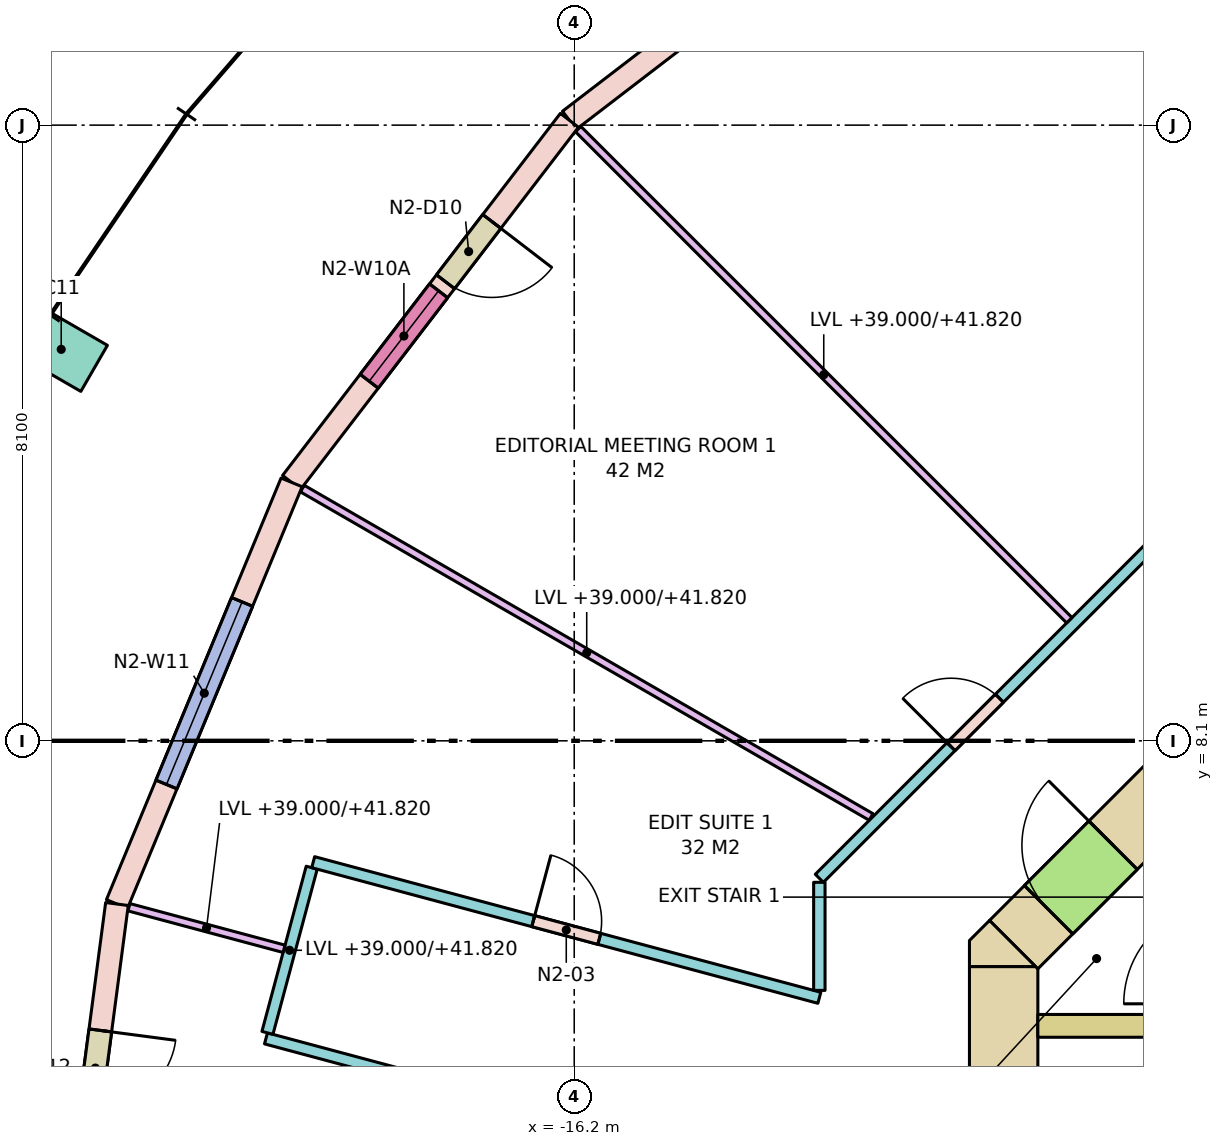
"""IFC4 building model, lengths in metres.
Left out: names, types, materials, properties, quantities, classifications, styles, units other than length and angle.
Written with IfcOpenShell. Run it as: python <this file> out.ifc"""

import sys

from ifc_helpers import new_model, si_unit, direction, frame, frame_2d, origin, origin_2d, place, context, subcontext, project, spatial, polyline, rectangle, outline, extrude, element, fill, save


model = new_model("IFC4")
c1 = context("Model", 3, precision=1e-05, world=origin(), true_north=direction((0.0, 1.0)))
c2 = subcontext(c1, "Body", "Model", "MODEL_VIEW")
j1 = project(units=[si_unit("LENGTHUNIT", "METRE"), si_unit("PLANEANGLEUNIT", "RADIAN")], contexts=[c1])
p1 = place(None, origin())
s1 = spatial("IfcSite", under=j1, at=p1, CompositionType="ELEMENT")
p2 = place(p1, origin())
s2 = spatial("IfcBuilding", under=s1, at=p2, CompositionType="ELEMENT")
p3 = place(p2, frame((0.0, 0.0, 39.0)))
s3 = spatial("IfcBuildingStorey", under=s2, at=p3, CompositionType="ELEMENT", Elevation=39.0)
p4 = place(p3, frame((-22.95, 13.25, 0.0), z_axis=(0.0, 0.0, 1.0), x_axis=(-0.5, -0.866025403784, 0.0)))
e1 = element("IfcColumn", 1, at=p4, inside=s3, PredefinedType="COLUMN", context=c2, shape_type="SweptSolid", body=[
    extrude(rectangle(XDim=0.7, YDim=1.0, at=origin_2d()), origin(), (0.0, 0.0, 1.0), 4.0),
])
p5 = place(p3, frame((-10.55, -5.13, -0.28), z_axis=(0.0, 0.0, 1.0), x_axis=(0.0, 1.0, 0.0)))
e2 = element("IfcWall", 2, at=p5, inside=s3, PredefinedType="SHEAR", context=c2, shape_type="SweptSolid", body=[
    extrude(rectangle(XDim=10.26, YDim=0.9, at=frame_2d((5.13, 0.0))), origin(), (0.0, 0.0, 1.0), 4.0),
])
p6 = place(p5, frame((4.13, 0.0, 0.28)))
e3 = element("IfcOpeningElement", 3, at=p6, cuts=e2, PredefinedType="OPENING", context=c2, shape_type="SweptSolid", body=[
    extrude(rectangle(XDim=2.0, YDim=2.1, at=frame_2d((1.0, 1.05))), frame((0.0, 0.46, 0.0), z_axis=(0.0, -1.0, 0.0), x_axis=(1.0, 0.0, 0.0)), (0.0, 0.0, 1.0), 0.92),
])
p7 = place(p3, frame((-10.418, 5.418, -0.28), z_axis=(0.0, 0.0, 1.0), x_axis=(0.707106781187, 0.707106781187, 0.0)))
e4 = element("IfcWall", 4, at=p7, inside=s3, PredefinedType="SHEAR", context=c2, shape_type="SweptSolid", body=[
    extrude(rectangle(XDim=4.243, YDim=0.9, at=frame_2d((2.121, 0.0))), origin(), (0.0, 0.0, 1.0), 4.0),
])
p8 = place(p7, frame((0.65, 0.0, 0.28)))
e5 = element("IfcOpeningElement", 5, at=p8, cuts=e4, PredefinedType="OPENING", context=c2, shape_type="SweptSolid", body=[
    extrude(rectangle(XDim=1.2, YDim=2.1, at=frame_2d((0.6, 1.05))), frame((0.0, 0.46, 0.0), z_axis=(0.0, -1.0, 0.0), x_axis=(1.0, 0.0, 0.0)), (0.0, 0.0, 1.0), 0.92),
])
p9 = place(p3, frame((0.0, 0.0, -0.28)))
e6 = element("IfcWall", 6, at=p9, inside=s3, PredefinedType="SHEAR", context=c2, shape_type="SweptSolid", body=[
    extrude(outline(polyline([(-10.736, 5.736), (-10.13, 5.13), (-11.0, 5.13), (-11.0, 5.473), (-10.736, 5.736)])), origin(), (0.0, 0.0, 1.0), 4.0),
])
p10 = place(p3, frame((-10.1, 4.35, 0.0), z_axis=(0.0, 0.0, 1.0), x_axis=(1.0, 0.0, 0.0)))
e7 = element("IfcWall", 7, at=p10, inside=s3, PredefinedType="SOLIDWALL", context=c2, shape_type="SweptSolid", body=[
    extrude(rectangle(XDim=8.1, YDim=0.3, at=frame_2d((4.05, 0.0))), origin(), (0.0, 0.0, 1.0), 3.72),
])
p11 = place(p3, frame((-11.5, 19.919, 0.0), z_axis=(0.0, 0.0, 1.0), x_axis=(-0.793339924758, -0.608778912074, 0.0)))
e8 = element("IfcWall", 8, at=p11, inside=s3, PredefinedType="STANDARD", context=c2, shape_type="SweptSolid", body=[
    extrude(rectangle(XDim=6.004, YDim=0.3, at=frame_2d((3.002, 0.0))), origin(), (0.0, 0.0, 1.0), 3.72),
])
p12 = place(p11, frame((1.702, 0.0, 0.8)))
e9 = element("IfcOpeningElement", 9, at=p12, cuts=e8, PredefinedType="OPENING", context=c2, shape_type="SweptSolid", body=[
    extrude(rectangle(XDim=2.6, YDim=2.7, at=frame_2d((1.3, 1.35))), frame((0.0, 0.16, 0.0), z_axis=(0.0, -1.0, 0.0), x_axis=(1.0, 0.0, 0.0)), (0.0, 0.0, 1.0), 0.32),
])
p13 = place(p3, frame((-16.263, 16.263, 0.0), z_axis=(0.0, 0.0, 1.0), x_axis=(-0.608778912074, -0.793339924758, 0.0)))
e10 = element("IfcWall", 10, at=p13, inside=s3, PredefinedType="STANDARD", context=c2, shape_type="SweptSolid", body=[
    extrude(rectangle(XDim=6.004, YDim=0.3, at=frame_2d((3.002, 0.0))), origin(), (0.0, 0.0, 1.0), 3.72),
])
p14 = place(p13, frame((1.677, 0.0, 0.0)))
e11 = element("IfcOpeningElement", 11, at=p14, cuts=e10, PredefinedType="OPENING", context=c2, shape_type="SweptSolid", body=[
    extrude(rectangle(XDim=1.0, YDim=2.4, at=frame_2d((0.5, 1.2))), frame((0.0, 0.16, 0.0), z_axis=(0.0, -1.0, 0.0), x_axis=(1.0, 0.0, 0.0)), (0.0, 0.0, 1.0), 0.32),
])
p15 = place(p13, frame((2.827, 0.0, 0.8)))
e12 = element("IfcOpeningElement", 12, at=p15, cuts=e10, PredefinedType="OPENING", context=c2, shape_type="SweptSolid", body=[
    extrude(rectangle(XDim=1.5, YDim=2.7, at=frame_2d((0.75, 1.35))), frame((0.0, 0.16, 0.0), z_axis=(0.0, -1.0, 0.0), x_axis=(1.0, 0.0, 0.0)), (0.0, 0.0, 1.0), 0.32),
])
p16 = place(p3, frame((-19.919, 11.5, 0.0), z_axis=(0.0, 0.0, 1.0), x_axis=(-0.382671411433, -0.923884511653, 0.0)))
e13 = element("IfcWall", 13, at=p16, inside=s3, PredefinedType="STANDARD", context=c2, shape_type="SweptSolid", body=[
    extrude(rectangle(XDim=6.004, YDim=0.3, at=frame_2d((3.002, 0.0))), origin(), (0.0, 0.0, 1.0), 3.72),
])
p17 = place(p16, frame((1.702, 0.0, 0.8)))
e14 = element("IfcOpeningElement", 14, at=p17, cuts=e13, PredefinedType="OPENING", context=c2, shape_type="SweptSolid", body=[
    extrude(rectangle(XDim=2.6, YDim=2.7, at=frame_2d((1.3, 1.35))), frame((0.0, 0.16, 0.0), z_axis=(0.0, -1.0, 0.0), x_axis=(1.0, 0.0, 0.0)), (0.0, 0.0, 1.0), 0.32),
])
p18 = place(p3, frame((-22.216, 5.953, 0.0), z_axis=(0.0, 0.0, 1.0), x_axis=(-0.130522880875, -0.991445297315, 0.0)))
e15 = element("IfcWall", 15, at=p18, inside=s3, PredefinedType="STANDARD", context=c2, shape_type="SweptSolid", body=[
    extrude(rectangle(XDim=6.004, YDim=0.3, at=frame_2d((3.002, 0.0))), origin(), (0.0, 0.0, 1.0), 3.72),
])
p19 = place(p18, frame((1.677, 0.0, 0.0)))
e16 = element("IfcOpeningElement", 16, at=p19, cuts=e15, PredefinedType="OPENING", context=c2, shape_type="SweptSolid", body=[
    extrude(rectangle(XDim=1.0, YDim=2.4, at=frame_2d((0.5, 1.2))), frame((0.0, 0.16, 0.0), z_axis=(0.0, -1.0, 0.0), x_axis=(1.0, 0.0, 0.0)), (0.0, 0.0, 1.0), 0.32),
])
p20 = place(p18, frame((2.827, 0.0, 0.8)))
e17 = element("IfcOpeningElement", 17, at=p20, cuts=e15, PredefinedType="OPENING", context=c2, shape_type="SweptSolid", body=[
    extrude(rectangle(XDim=1.5, YDim=2.7, at=frame_2d((0.75, 1.35))), frame((0.0, 0.16, 0.0), z_axis=(0.0, -1.0, 0.0), x_axis=(1.0, 0.0, 0.0)), (0.0, 0.0, 1.0), 0.32),
])
p21 = place(p3, frame((-13.045, 2.253, 0.0), z_axis=(0.0, 0.0, 1.0), x_axis=(-0.965924840231, 0.258822725092, 0.0)))
e18 = element("IfcWall", 18, at=p21, inside=s3, PredefinedType="PARTITIONING", context=c2, shape_type="SweptSolid", body=[
    extrude(rectangle(XDim=7.465, YDim=0.15, at=frame_2d((3.732, 0.0))), origin(), (0.0, 0.0, 1.0), 3.72),
])
p22 = place(p3, frame((-20.236, 4.258, 0.0), z_axis=(0.0, 0.0, 1.0), x_axis=(0.258891558609, 0.965906393436, 0.0)))
e19 = element("IfcWall", 19, at=p22, inside=s3, PredefinedType="PARTITIONING", context=c2, shape_type="SweptSolid", body=[
    extrude(rectangle(XDim=2.25, YDim=0.15, at=frame_2d((1.125, 0.0))), origin(), (0.0, 0.0, 1.0), 2.82),
])
p23 = place(p3, frame((-19.635, 6.503, 0.0), z_axis=(0.0, 0.0, 1.0), x_axis=(0.965924499418, -0.258823997003, 0.0)))
e20 = element("IfcWall", 20, at=p23, inside=s3, PredefinedType="PARTITIONING", context=c2, shape_type="SweptSolid", body=[
    extrude(rectangle(XDim=6.894, YDim=0.15, at=frame_2d((3.447, 0.0))), origin(), (0.0, 0.0, 1.0), 3.72),
])
p24 = place(p23, frame((2.997, 0.0, 0.0)))
e21 = element("IfcOpeningElement", 21, at=p24, cuts=e20, PredefinedType="OPENING", context=c2, shape_type="SweptSolid", body=[
    extrude(rectangle(XDim=0.9, YDim=2.1, at=frame_2d((0.45, 1.05))), frame((0.0, 0.085, 0.0), z_axis=(0.0, -1.0, 0.0), x_axis=(1.0, 0.0, 0.0)), (0.0, 0.0, 1.0), 0.17),
])
p25 = place(p3, frame((-12.975, 4.816, 0.0), z_axis=(0.0, 0.0, 1.0), x_axis=(0.0, 1.0, 0.0)))
e22 = element("IfcWall", 22, at=p25, inside=s3, PredefinedType="PARTITIONING", context=c2, shape_type="SweptSolid", body=[
    extrude(rectangle(XDim=1.422, YDim=0.15, at=frame_2d((0.711, 0.0))), origin(), (0.0, 0.0, 1.0), 3.72),
])
p26 = place(p3, frame((-12.975, 6.291, 0.0), z_axis=(0.0, 0.0, 1.0), x_axis=(0.707125355289, 0.707088206597, 0.0)))
e23 = element("IfcWall", 23, at=p26, inside=s3, PredefinedType="PARTITIONING", context=c2, shape_type="SweptSolid", body=[
    extrude(rectangle(XDim=6.572, YDim=0.15, at=frame_2d((3.286, 0.0))), origin(), (0.0, 0.0, 1.0), 2.82),
])
p27 = place(p26, frame((2.45, 0.0, 0.0)))
e24 = element("IfcOpeningElement", 24, at=p27, cuts=e23, PredefinedType="OPENING", context=c2, shape_type="SweptSolid", body=[
    extrude(rectangle(XDim=0.9, YDim=2.1, at=frame_2d((0.45, 1.05))), frame((0.0, 0.085, 0.0), z_axis=(0.0, -1.0, 0.0), x_axis=(1.0, 0.0, 0.0)), (0.0, 0.0, 1.0), 0.17),
])
p28 = place(p3, frame((-9.686, 9.686, 0.0), z_axis=(0.0, 0.0, 1.0), x_axis=(-0.707106781187, 0.707106781187, 0.0)))
e25 = element("IfcWall", 25, at=p28, inside=s3, PredefinedType="PARTITIONING", context=c2, shape_type="SweptSolid", body=[
    extrude(rectangle(XDim=9.138, YDim=0.1, at=frame_2d((4.569, 0.0))), origin(), (0.0, 0.0, 1.0), 2.82),
])
p29 = place(p3, frame((-12.294, 7.098, 0.0), z_axis=(0.0, 0.0, 1.0), x_axis=(-0.866010547425, 0.500025731086, 0.0)))
e26 = element("IfcWall", 26, at=p29, inside=s3, PredefinedType="PARTITIONING", context=c2, shape_type="SweptSolid", body=[
    extrude(rectangle(XDim=8.641, YDim=0.1, at=frame_2d((4.32, 0.0))), origin(), (0.0, 0.0, 1.0), 2.82),
])
p30 = place(p3, frame((-20.018, 5.364, 0.0), z_axis=(0.0, 0.0, 1.0), x_axis=(-0.965927422152, 0.258813089189, 0.0)))
e27 = element("IfcWall", 27, at=p30, inside=s3, PredefinedType="PARTITIONING", context=c2, shape_type="SweptSolid", body=[
    extrude(rectangle(XDim=2.113, YDim=0.1, at=frame_2d((1.057, 0.0))), origin(), (0.0, 0.0, 1.0), 2.82),
])
p31 = place(p14, origin())
e28 = element("IfcDoor", 28, at=p31, inside=s3, OperationType="SINGLE_SWING_LEFT", PredefinedType="DOOR", context=c2, shape_type="SweptSolid", body=[
    extrude(rectangle(XDim=1.0, YDim=2.4, at=frame_2d((0.5, 1.2))), frame((0.0, 0.025, 0.0), z_axis=(0.0, -1.0, 0.0), x_axis=(1.0, 0.0, 0.0)), (0.0, 0.0, 1.0), 0.05),
])
fill(e11, e28)
p32 = place(p15, origin())
e29 = element("IfcWindow", 29, at=p32, inside=s3, PartitioningType="SINGLE_PANEL", PredefinedType="WINDOW", context=c2, shape_type="SweptSolid", body=[
    extrude(rectangle(XDim=1.5, YDim=2.7, at=frame_2d((0.75, 1.35))), frame((0.0, 0.03, 0.0), z_axis=(0.0, -1.0, 0.0), x_axis=(1.0, 0.0, 0.0)), (0.0, 0.0, 1.0), 0.06),
])
fill(e12, e29)
p33 = place(p17, origin())
e30 = element("IfcWindow", 30, at=p33, inside=s3, PartitioningType="SINGLE_PANEL", PredefinedType="WINDOW", context=c2, shape_type="SweptSolid", body=[
    extrude(rectangle(XDim=2.6, YDim=2.7, at=frame_2d((1.3, 1.35))), frame((0.0, 0.03, 0.0), z_axis=(0.0, -1.0, 0.0), x_axis=(1.0, 0.0, 0.0)), (0.0, 0.0, 1.0), 0.06),
])
fill(e14, e30)
p34 = place(p19, origin())
e31 = element("IfcDoor", 31, at=p34, inside=s3, OperationType="SINGLE_SWING_LEFT", PredefinedType="DOOR", context=c2, shape_type="SweptSolid", body=[
    extrude(rectangle(XDim=1.0, YDim=2.4, at=frame_2d((0.5, 1.2))), frame((0.0, 0.025, 0.0), z_axis=(0.0, -1.0, 0.0), x_axis=(1.0, 0.0, 0.0)), (0.0, 0.0, 1.0), 0.05),
])
fill(e16, e31)
p35 = place(p8, origin())
e32 = element("IfcDoor", 32, at=p35, inside=s3, OperationType="SINGLE_SWING_RIGHT", PredefinedType="DOOR", context=c2, shape_type="SweptSolid", body=[
    extrude(rectangle(XDim=1.2, YDim=2.1, at=frame_2d((0.6, 1.05))), frame((0.0, 0.025, 0.0), z_axis=(0.0, -1.0, 0.0), x_axis=(1.0, 0.0, 0.0)), (0.0, 0.0, 1.0), 0.05),
])
fill(e5, e32)
p36 = place(p27, origin())
e33 = element("IfcDoor", 33, at=p36, inside=s3, OperationType="SINGLE_SWING_LEFT", PredefinedType="DOOR", context=c2, shape_type="SweptSolid", body=[
    extrude(rectangle(XDim=0.9, YDim=2.1, at=frame_2d((0.45, 1.05))), frame((0.0, 0.025, 0.0), z_axis=(0.0, -1.0, 0.0), x_axis=(1.0, 0.0, 0.0)), (0.0, 0.0, 1.0), 0.05),
])
fill(e24, e33)
p37 = place(p24, origin())
e34 = element("IfcDoor", 34, at=p37, inside=s3, OperationType="SINGLE_SWING_LEFT", PredefinedType="DOOR", context=c2, shape_type="SweptSolid", body=[
    extrude(rectangle(XDim=0.9, YDim=2.1, at=frame_2d((0.45, 1.05))), frame((0.0, 0.025, 0.0), z_axis=(0.0, -1.0, 0.0), x_axis=(1.0, 0.0, 0.0)), (0.0, 0.0, 1.0), 0.05),
])
fill(e21, e34)
save(model, sys.argv[1])
